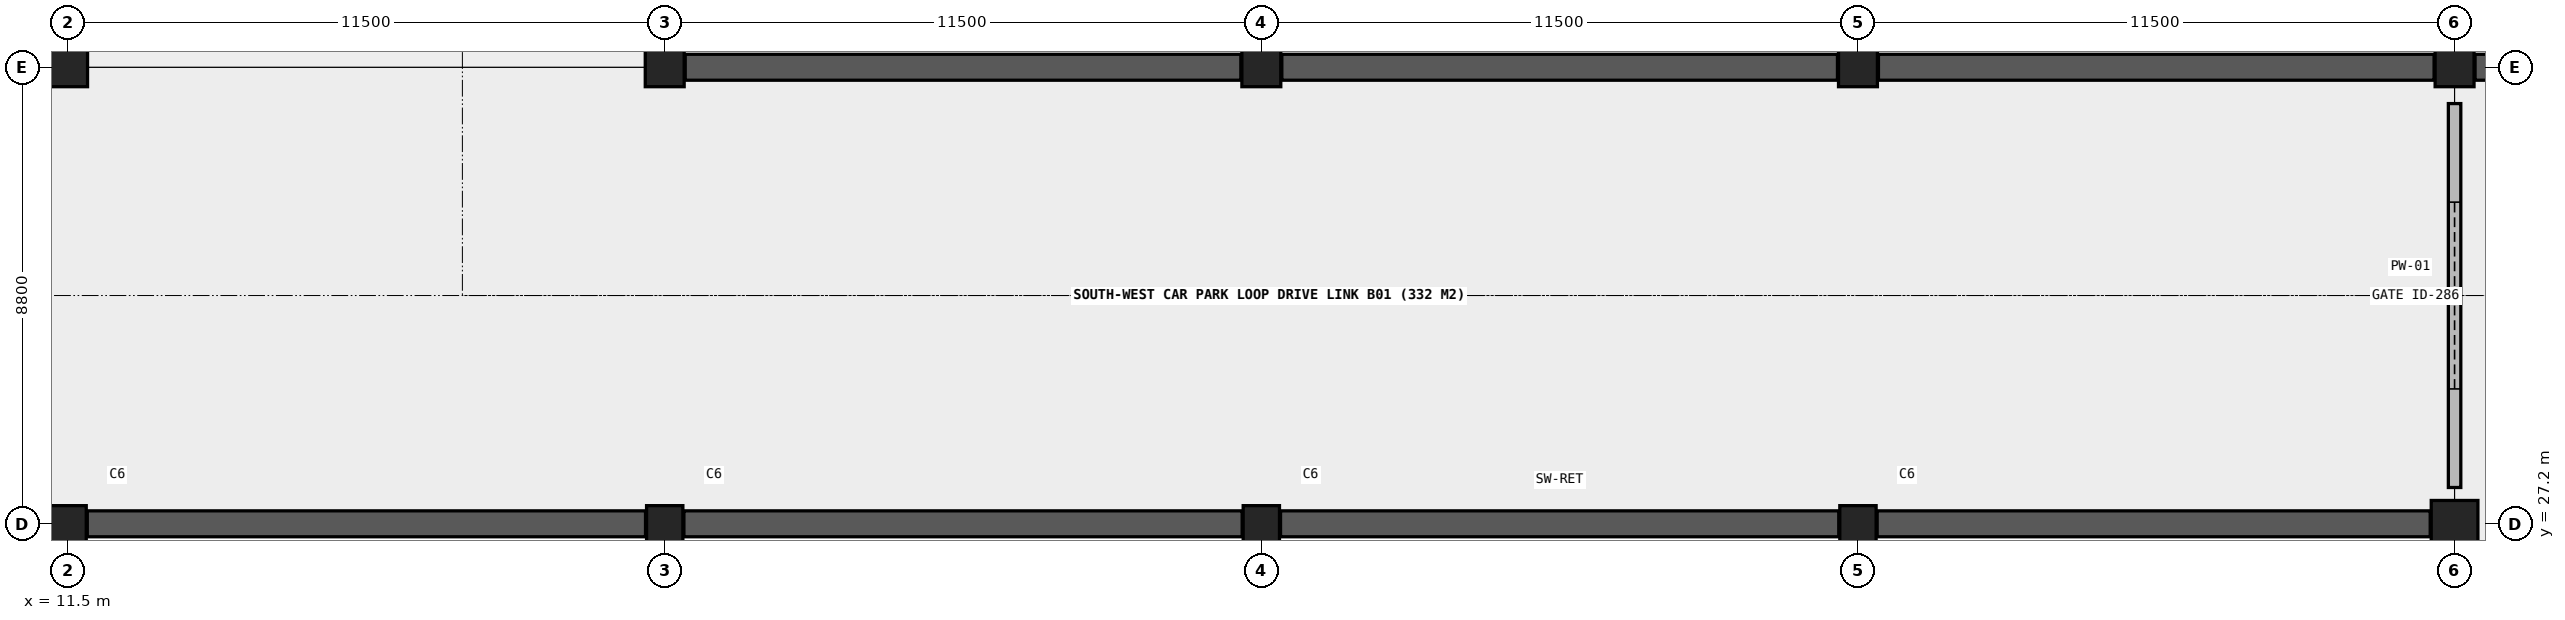
"""IFC4 building model, lengths in metres.
Left out: names, types, materials, properties, quantities, classifications, styles, units other than length and angle.
Written with IfcOpenShell. Run it as: python <this file> out.ifc"""

import sys

from ifc_helpers import new_model, si_unit, direction, frame, frame_2d, origin, origin_2d, place, context, subcontext, project, spatial, rectangle, circle, extrude, element, fill, save


model = new_model("IFC4")
c1 = context("Model", 3, precision=1e-05, world=origin(), true_north=direction((0.0, 1.0)))
c2 = subcontext(c1, "Body", "Model", "MODEL_VIEW")
j1 = project(units=[si_unit("LENGTHUNIT", "METRE"), si_unit("PLANEANGLEUNIT", "RADIAN")], contexts=[c1])
p1 = place(None, origin())
s1 = spatial("IfcSite", under=j1, at=p1, CompositionType="ELEMENT")
p2 = place(p1, origin())
s2 = spatial("IfcBuilding", under=s1, at=p2, CompositionType="ELEMENT")
p3 = place(p2, frame((0.0, 0.0, -4.2)))
s3 = spatial("IfcBuildingStorey", under=s2, at=p3, CompositionType="ELEMENT", Elevation=-4.2)
p4 = place(p3, frame((11.5, 27.2, 0.0), z_axis=(0.0, 0.0, 1.0), x_axis=(1.0, 0.0, 0.0)))
e1 = element("IfcColumn", 1, at=p4, inside=s3, PredefinedType="COLUMN", context=c2, shape_type="SweptSolid", body=[
    extrude(rectangle(XDim=0.7, YDim=0.7, at=origin_2d()), origin(), (0.0, 0.0, 1.0), 4.2),
])
p5 = place(p3, frame((11.5, 36.0, 0.0), z_axis=(0.0, 0.0, 1.0), x_axis=(1.0, 0.0, 0.0)))
e2 = element("IfcColumn", 2, at=p5, inside=s3, PredefinedType="COLUMN", context=c2, shape_type="SweptSolid", body=[
    extrude(rectangle(XDim=0.75, YDim=0.75, at=origin_2d()), origin(), (0.0, 0.0, 1.0), 4.2),
])
p6 = place(p3, frame((23.0, 27.2, 0.0), z_axis=(0.0, 0.0, 1.0), x_axis=(1.0, 0.0, 0.0)))
e3 = element("IfcColumn", 3, at=p6, inside=s3, PredefinedType="COLUMN", context=c2, shape_type="SweptSolid", body=[
    extrude(rectangle(XDim=0.7, YDim=0.7, at=origin_2d()), origin(), (0.0, 0.0, 1.0), 4.2),
])
p7 = place(p3, frame((23.0, 36.0, 0.0), z_axis=(0.0, 0.0, 1.0), x_axis=(1.0, 0.0, 0.0)))
e4 = element("IfcColumn", 4, at=p7, inside=s3, PredefinedType="COLUMN", context=c2, shape_type="SweptSolid", body=[
    extrude(rectangle(XDim=0.75, YDim=0.75, at=origin_2d()), origin(), (0.0, 0.0, 1.0), 4.2),
])
p8 = place(p3, frame((34.5, 27.2, 0.0), z_axis=(0.0, 0.0, 1.0), x_axis=(1.0, 0.0, 0.0)))
e5 = element("IfcColumn", 5, at=p8, inside=s3, PredefinedType="COLUMN", context=c2, shape_type="SweptSolid", body=[
    extrude(rectangle(XDim=0.7, YDim=0.7, at=origin_2d()), origin(), (0.0, 0.0, 1.0), 4.2),
])
p9 = place(p3, frame((34.5, 36.0, 0.0), z_axis=(0.0, 0.0, 1.0), x_axis=(1.0, 0.0, 0.0)))
e6 = element("IfcColumn", 6, at=p9, inside=s3, PredefinedType="COLUMN", context=c2, shape_type="SweptSolid", body=[
    extrude(rectangle(XDim=0.75, YDim=0.75, at=origin_2d()), origin(), (0.0, 0.0, 1.0), 4.2),
])
p10 = place(p3, frame((46.0, 27.2, 0.0), z_axis=(0.0, 0.0, 1.0), x_axis=(1.0, 0.0, 0.0)))
e7 = element("IfcColumn", 7, at=p10, inside=s3, PredefinedType="COLUMN", context=c2, shape_type="SweptSolid", body=[
    extrude(rectangle(XDim=0.7, YDim=0.7, at=origin_2d()), origin(), (0.0, 0.0, 1.0), 4.2),
])
p11 = place(p3, frame((46.0, 36.0, 0.0), z_axis=(0.0, 0.0, 1.0), x_axis=(1.0, 0.0, 0.0)))
e8 = element("IfcColumn", 8, at=p11, inside=s3, PredefinedType="COLUMN", context=c2, shape_type="SweptSolid", body=[
    extrude(rectangle(XDim=0.75, YDim=0.75, at=origin_2d()), origin(), (0.0, 0.0, 1.0), 4.2),
])
p12 = place(p3, frame((57.5, 27.2, 0.0), z_axis=(0.0, 0.0, 1.0), x_axis=(1.0, 0.0, 0.0)))
e9 = element("IfcColumn", 9, at=p12, inside=s3, PredefinedType="COLUMN", context=c2, shape_type="SweptSolid", body=[
    extrude(circle(Radius=0.45, at=origin_2d()), origin(), (0.0, 0.0, 1.0), 4.2),
])
p13 = place(p3, frame((57.5, 36.0, 0.0), z_axis=(0.0, 0.0, 1.0), x_axis=(1.0, 0.0, 0.0)))
e10 = element("IfcColumn", 10, at=p13, inside=s3, PredefinedType="COLUMN", context=c2, shape_type="SweptSolid", body=[
    extrude(rectangle(XDim=0.75, YDim=0.75, at=origin_2d()), origin(), (0.0, 0.0, 1.0), 4.2),
])
for number, where, z_axis, x_axis in (
    (11, (11.87, 27.2, 0.0), (0.0, 0.0, 1.0), (1.0, 0.0, 0.0)),
    (12, (23.37, 27.2, 0.0), (0.0, 0.0, 1.0), (1.0, 0.0, 0.0)),
    (13, (34.87, 27.2, 0.0), (0.0, 0.0, 1.0), (1.0, 0.0, 0.0)),
):
    element("IfcWall", number, at=place(p3, frame(where, z_axis=z_axis, x_axis=x_axis)), inside=s3, PredefinedType="SHEAR", context=c2, shape_type="SweptSolid", body=[
        extrude(rectangle(XDim=10.76, YDim=0.5, at=frame_2d((5.38, 0.0))), origin(), (0.0, 0.0, 1.0), 4.2),
    ])
p14 = place(p3, frame((46.37, 27.2, 0.0), z_axis=(0.0, 0.0, 1.0), x_axis=(1.0, 0.0, 0.0)))
e14 = element("IfcWall", 14, at=p14, inside=s3, PredefinedType="SHEAR", context=c2, shape_type="SweptSolid", body=[
    extrude(rectangle(XDim=10.66, YDim=0.5, at=frame_2d((5.33, 0.0))), origin(), (0.0, 0.0, 1.0), 4.2),
])
for number, where, z_axis, x_axis in (
    (15, (23.395, 36.0, 0.0), (0.0, 0.0, 1.0), (1.0, 0.0, 0.0)),
    (16, (34.895, 36.0, 0.0), (0.0, 0.0, 1.0), (1.0, 0.0, 0.0)),
    (17, (46.395, 36.0, 0.0), (0.0, 0.0, 1.0), (1.0, 0.0, 0.0)),
    (18, (57.895, 36.0, 0.0), (0.0, 0.0, 1.0), (1.0, 0.0, 0.0)),
):
    element("IfcWall", number, at=place(p3, frame(where, z_axis=z_axis, x_axis=x_axis)), inside=s3, PredefinedType="SHEAR", context=c2, shape_type="SweptSolid", body=[
        extrude(rectangle(XDim=10.71, YDim=0.5, at=frame_2d((5.355, 0.0))), origin(), (0.0, 0.0, 1.0), 4.2),
    ])
p15 = place(p3, frame((57.5, 27.9, 0.0), z_axis=(0.0, 0.0, 1.0), x_axis=(0.0, 1.0, 0.0)))
e19 = element("IfcWall", 19, at=p15, inside=s3, PredefinedType="SOLIDWALL", context=c2, shape_type="SweptSolid", body=[
    extrude(rectangle(XDim=7.4, YDim=0.24, at=frame_2d((3.7, 0.0))), origin(), (0.0, 0.0, 1.0), 2.98),
])
p16 = place(p15, frame((1.9, 0.0, 0.0)))
e20 = element("IfcOpeningElement", 20, at=p16, cuts=e19, PredefinedType="OPENING", context=c2, shape_type="SweptSolid", body=[
    extrude(rectangle(XDim=3.6, YDim=2.8, at=frame_2d((1.8, 1.4))), frame((0.0, 0.13, 0.0), z_axis=(0.0, -1.0, 0.0), x_axis=(1.0, 0.0, 0.0)), (0.0, 0.0, 1.0), 0.26),
])
p17 = place(p16, origin())
e21 = element("IfcDoor", 21, at=p17, inside=s3, OperationType="ROLLINGUP", PredefinedType="GATE", context=c2, shape_type="SweptSolid", body=[
    extrude(rectangle(XDim=3.6, YDim=2.8, at=frame_2d((1.8, 1.4))), frame((0.0, 0.025, 0.0), z_axis=(0.0, -1.0, 0.0), x_axis=(1.0, 0.0, 0.0)), (0.0, 0.0, 1.0), 0.05),
])
fill(e20, e21)
save(model, sys.argv[1])
